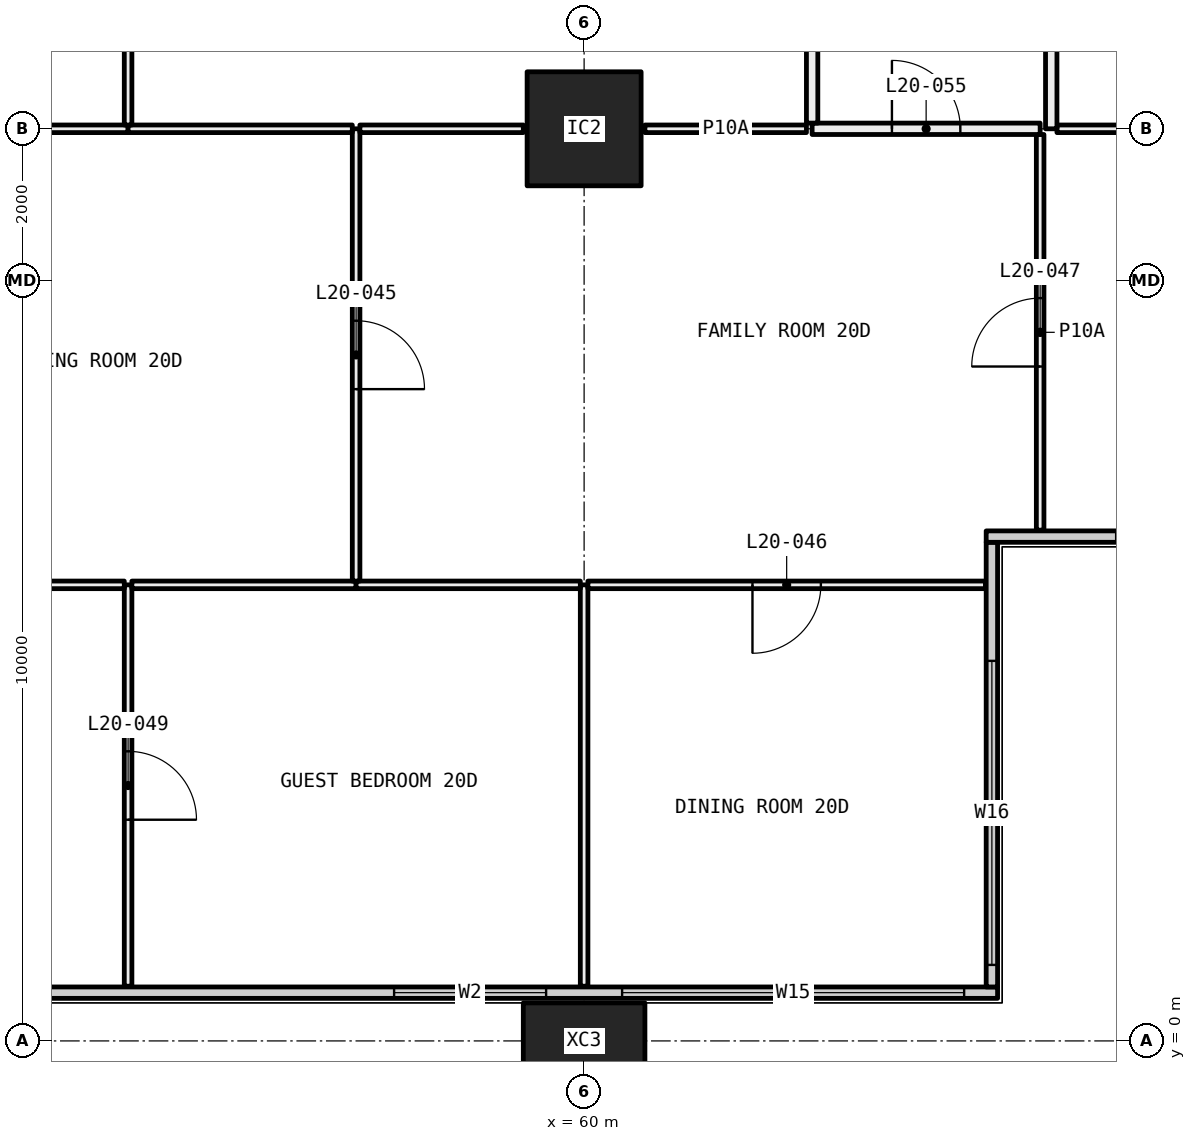
"""IFC4 building model, lengths in metres.
Left out: names, types, materials, properties, quantities, classifications, styles, units other than length and angle.
Written with IfcOpenShell. Run it as: python <this file> out.ifc"""

import sys

from ifc_helpers import new_model, si_unit, direction, frame, frame_2d, origin, origin_2d, place, context, subcontext, project, spatial, rectangle, hollow_rectangle, extrude, element, fill, save


model = new_model("IFC4")
c1 = context("Model", 3, precision=1e-05, world=origin(), true_north=direction((0.0, 1.0)))
c2 = subcontext(c1, "Body", "Model", "MODEL_VIEW")
j1 = project(units=[si_unit("LENGTHUNIT", "METRE"), si_unit("PLANEANGLEUNIT", "RADIAN")], contexts=[c1])
p1 = place(None, origin())
s1 = spatial("IfcSite", under=j1, at=p1, CompositionType="ELEMENT")
p2 = place(p1, origin())
s2 = spatial("IfcBuilding", under=s1, at=p2, CompositionType="ELEMENT")
p3 = place(p2, frame((0.0, 0.0, 81.75)))
s3 = spatial("IfcBuildingStorey", under=s2, at=p3, CompositionType="ELEMENT", Elevation=81.75)
p4 = place(p3, frame((60.0, 0.0, -0.4), z_axis=(0.0, 0.0, 1.0), x_axis=(1.0, 0.0, 0.0)))
e1 = element("IfcColumn", 1, at=p4, inside=s3, PredefinedType="COLUMN", context=c2, shape_type="SweptSolid", body=[
    extrude(hollow_rectangle(XDim=1.6, YDim=1.0, WallThickness=0.065, at=origin_2d()), origin(), (0.0, 0.0, 1.0), 3.45),
])
p5 = place(p3, frame((60.0, 12.0, 0.0), z_axis=(0.0, 0.0, 1.0), x_axis=(1.0, 0.0, 0.0)))
e2 = element("IfcColumn", 2, at=p5, inside=s3, PredefinedType="COLUMN", context=c2, shape_type="SweptSolid", body=[
    extrude(hollow_rectangle(XDim=1.5, YDim=1.5, WallThickness=0.065, at=origin_2d()), origin(), (0.0, 0.0, 1.0), 3.05),
])
p6 = place(p3, frame((6.56, 0.635, 0.0), z_axis=(0.0, 0.0, 1.0), x_axis=(1.0, 0.0, 0.0)))
e3 = element("IfcWall", 3, at=p6, inside=s3, PredefinedType="ELEMENTEDWALL", context=c2, shape_type="SweptSolid", body=[
    extrude(rectangle(XDim=58.88, YDim=0.15, at=frame_2d((29.44, 0.0))), origin(), (0.0, 0.0, 1.0), 3.05),
])
p7 = place(p6, frame((0.44, 0.0, 0.45)))
e4 = element("IfcOpeningElement", 4, at=p7, cuts=e3, PredefinedType="OPENING", context=c2, shape_type="SweptSolid", body=[
    extrude(rectangle(XDim=4.5, YDim=2.55, at=frame_2d((2.25, 1.275))), frame((0.0, 0.085, 0.0), z_axis=(0.0, -1.0, 0.0), x_axis=(1.0, 0.0, 0.0)), (0.0, 0.0, 1.0), 0.17),
])
p8 = place(p6, frame((5.94, 0.0, 0.45)))
e5 = element("IfcOpeningElement", 5, at=p8, cuts=e3, PredefinedType="OPENING", context=c2, shape_type="SweptSolid", body=[
    extrude(rectangle(XDim=3.0, YDim=2.55, at=frame_2d((1.5, 1.275))), frame((0.0, 0.085, 0.0), z_axis=(0.0, -1.0, 0.0), x_axis=(1.0, 0.0, 0.0)), (0.0, 0.0, 1.0), 0.17),
])
p9 = place(p6, frame((13.94, 0.0, 0.45)))
e6 = element("IfcOpeningElement", 6, at=p9, cuts=e3, PredefinedType="OPENING", context=c2, shape_type="SweptSolid", body=[
    extrude(rectangle(XDim=3.0, YDim=2.55, at=frame_2d((1.5, 1.275))), frame((0.0, 0.085, 0.0), z_axis=(0.0, -1.0, 0.0), x_axis=(1.0, 0.0, 0.0)), (0.0, 0.0, 1.0), 0.17),
])
p10 = place(p6, frame((17.94, 0.0, 0.45)))
e7 = element("IfcOpeningElement", 7, at=p10, cuts=e3, PredefinedType="OPENING", context=c2, shape_type="SweptSolid", body=[
    extrude(rectangle(XDim=3.0, YDim=2.55, at=frame_2d((1.5, 1.275))), frame((0.0, 0.085, 0.0), z_axis=(0.0, -1.0, 0.0), x_axis=(1.0, 0.0, 0.0)), (0.0, 0.0, 1.0), 0.17),
])
p11 = place(p6, frame((26.94, 0.0, 0.45)))
e8 = element("IfcOpeningElement", 8, at=p11, cuts=e3, PredefinedType="OPENING", context=c2, shape_type="SweptSolid", body=[
    extrude(rectangle(XDim=2.0, YDim=2.55, at=frame_2d((1.0, 1.275))), frame((0.0, 0.085, 0.0), z_axis=(0.0, -1.0, 0.0), x_axis=(1.0, 0.0, 0.0)), (0.0, 0.0, 1.0), 0.17),
])
p12 = place(p6, frame((29.94, 0.0, 0.45)))
e9 = element("IfcOpeningElement", 9, at=p12, cuts=e3, PredefinedType="OPENING", context=c2, shape_type="SweptSolid", body=[
    extrude(rectangle(XDim=3.0, YDim=2.55, at=frame_2d((1.5, 1.275))), frame((0.0, 0.085, 0.0), z_axis=(0.0, -1.0, 0.0), x_axis=(1.0, 0.0, 0.0)), (0.0, 0.0, 1.0), 0.17),
])
p13 = place(p6, frame((37.94, 0.0, 0.45)))
e10 = element("IfcOpeningElement", 10, at=p13, cuts=e3, PredefinedType="OPENING", context=c2, shape_type="SweptSolid", body=[
    extrude(rectangle(XDim=3.0, YDim=2.55, at=frame_2d((1.5, 1.275))), frame((0.0, 0.085, 0.0), z_axis=(0.0, -1.0, 0.0), x_axis=(1.0, 0.0, 0.0)), (0.0, 0.0, 1.0), 0.17),
])
p14 = place(p6, frame((41.94, 0.0, 0.45)))
e11 = element("IfcOpeningElement", 11, at=p14, cuts=e3, PredefinedType="OPENING", context=c2, shape_type="SweptSolid", body=[
    extrude(rectangle(XDim=3.0, YDim=2.55, at=frame_2d((1.5, 1.275))), frame((0.0, 0.085, 0.0), z_axis=(0.0, -1.0, 0.0), x_axis=(1.0, 0.0, 0.0)), (0.0, 0.0, 1.0), 0.17),
])
p15 = place(p6, frame((50.94, 0.0, 0.45)))
e12 = element("IfcOpeningElement", 12, at=p15, cuts=e3, PredefinedType="OPENING", context=c2, shape_type="SweptSolid", body=[
    extrude(rectangle(XDim=2.0, YDim=2.55, at=frame_2d((1.0, 1.275))), frame((0.0, 0.085, 0.0), z_axis=(0.0, -1.0, 0.0), x_axis=(1.0, 0.0, 0.0)), (0.0, 0.0, 1.0), 0.17),
])
p16 = place(p6, frame((53.94, 0.0, 0.45)))
e13 = element("IfcOpeningElement", 13, at=p16, cuts=e3, PredefinedType="OPENING", context=c2, shape_type="SweptSolid", body=[
    extrude(rectangle(XDim=4.5, YDim=2.55, at=frame_2d((2.25, 1.275))), frame((0.0, 0.085, 0.0), z_axis=(0.0, -1.0, 0.0), x_axis=(1.0, 0.0, 0.0)), (0.0, 0.0, 1.0), 0.17),
])
p17 = place(p3, frame((65.365, 0.71, 0.0), z_axis=(0.0, 0.0, 1.0), x_axis=(0.0, 1.0, 0.0)))
e14 = element("IfcWall", 14, at=p17, inside=s3, PredefinedType="ELEMENTEDWALL", context=c2, shape_type="SweptSolid", body=[
    extrude(rectangle(XDim=5.85, YDim=0.15, at=frame_2d((2.925, 0.0))), origin(), (0.0, 0.0, 1.0), 3.05),
])
p18 = place(p17, frame((0.29, 0.0, 0.45)))
e15 = element("IfcOpeningElement", 15, at=p18, cuts=e14, PredefinedType="OPENING", context=c2, shape_type="SweptSolid", body=[
    extrude(rectangle(XDim=4.0, YDim=2.55, at=frame_2d((2.0, 1.275))), frame((0.0, 0.085, 0.0), z_axis=(0.0, -1.0, 0.0), x_axis=(1.0, 0.0, 0.0)), (0.0, 0.0, 1.0), 0.17),
])
p19 = place(p3, frame((65.29, 6.635, 0.0), z_axis=(0.0, 0.0, 1.0), x_axis=(1.0, 0.0, 0.0)))
e16 = element("IfcWall", 16, at=p19, inside=s3, PredefinedType="ELEMENTEDWALL", context=c2, shape_type="SweptSolid", body=[
    extrude(rectangle(XDim=6.15, YDim=0.15, at=frame_2d((3.075, 0.0))), origin(), (0.0, 0.0, 1.0), 3.05),
])
p20 = place(p19, frame((1.71, 0.0, 0.45)))
e17 = element("IfcOpeningElement", 17, at=p20, cuts=e16, PredefinedType="OPENING", context=c2, shape_type="SweptSolid", body=[
    extrude(rectangle(XDim=4.0, YDim=2.55, at=frame_2d((2.0, 1.275))), frame((0.0, 0.085, 0.0), z_axis=(0.0, -1.0, 0.0), x_axis=(1.0, 0.0, 0.0)), (0.0, 0.0, 1.0), 0.17),
])
p21 = place(p3, frame((54.0, 0.72, 0.0), z_axis=(0.0, 0.0, 1.0), x_axis=(0.0, 1.0, 0.0)))
e18 = element("IfcWall", 18, at=p21, inside=s3, PredefinedType="PARTITIONING", context=c2, shape_type="SweptSolid", body=[
    extrude(rectangle(XDim=5.28, YDim=0.1, at=frame_2d((2.64, 0.0))), origin(), (0.0, 0.0, 1.0), 3.05),
])
p22 = place(p21, frame((2.19, 0.0, 0.0)))
e19 = element("IfcOpeningElement", 19, at=p22, cuts=e18, PredefinedType="OPENING", context=c2, shape_type="SweptSolid", body=[
    extrude(rectangle(XDim=0.9, YDim=2.1, at=frame_2d((0.45, 1.05))), frame((0.0, 0.06, 0.0), z_axis=(0.0, -1.0, 0.0), x_axis=(1.0, 0.0, 0.0)), (0.0, 0.0, 1.0), 0.12),
])
p23 = place(p3, frame((53.95, 6.0, 0.0), z_axis=(0.0, 0.0, 1.0), x_axis=(-1.0, 0.0, 0.0)))
e20 = element("IfcWall", 20, at=p23, inside=s3, PredefinedType="PARTITIONING", context=c2, shape_type="SweptSolid", body=[
    extrude(rectangle(XDim=5.95, YDim=0.1, at=frame_2d((2.975, 0.0))), origin(), (0.0, 0.0, 1.0), 2.45),
])
p24 = place(p23, frame((2.525, 0.0, 0.0)))
e21 = element("IfcOpeningElement", 21, at=p24, cuts=e20, PredefinedType="OPENING", context=c2, shape_type="SweptSolid", body=[
    extrude(rectangle(XDim=0.9, YDim=2.1, at=frame_2d((0.45, 1.05))), frame((0.0, 0.06, 0.0), z_axis=(0.0, -1.0, 0.0), x_axis=(1.0, 0.0, 0.0)), (0.0, 0.0, 1.0), 0.12),
])
p25 = place(p3, frame((60.0, 0.72, 0.0), z_axis=(0.0, 0.0, 1.0), x_axis=(0.0, 1.0, 0.0)))
e22 = element("IfcWall", 22, at=p25, inside=s3, PredefinedType="PARTITIONING", context=c2, shape_type="SweptSolid", body=[
    extrude(rectangle(XDim=5.28, YDim=0.1, at=frame_2d((2.64, 0.0))), origin(), (0.0, 0.0, 1.0), 2.45),
])
p26 = place(p3, frame((57.0, 6.0, 0.0), z_axis=(0.0, 0.0, 1.0), x_axis=(-1.0, 0.0, 0.0)))
e23 = element("IfcWall", 23, at=p26, inside=s3, PredefinedType="PARTITIONING", context=c2, shape_type="SweptSolid", body=[
    extrude(rectangle(XDim=2.95, YDim=0.1, at=frame_2d((1.475, 0.0))), origin(), (0.0, 0.0, 1.0), 3.05),
])
p27 = place(p3, frame((59.95, 6.0, 0.0), z_axis=(0.0, 0.0, 1.0), x_axis=(-1.0, 0.0, 0.0)))
e24 = element("IfcWall", 24, at=p27, inside=s3, PredefinedType="PARTITIONING", context=c2, shape_type="SweptSolid", body=[
    extrude(rectangle(XDim=2.95, YDim=0.1, at=frame_2d((1.475, 0.0))), origin(), (0.0, 0.0, 1.0), 2.45),
])
p28 = place(p3, frame((65.28, 6.0, 0.0), z_axis=(0.0, 0.0, 1.0), x_axis=(-1.0, 0.0, 0.0)))
e25 = element("IfcWall", 25, at=p28, inside=s3, PredefinedType="PARTITIONING", context=c2, shape_type="SweptSolid", body=[
    extrude(rectangle(XDim=5.23, YDim=0.1, at=frame_2d((2.615, 0.0))), origin(), (0.0, 0.0, 1.0), 2.45),
])
p29 = place(p28, frame((2.165, 0.0, 0.0)))
e26 = element("IfcOpeningElement", 26, at=p29, cuts=e25, PredefinedType="OPENING", context=c2, shape_type="SweptSolid", body=[
    extrude(rectangle(XDim=0.9, YDim=2.1, at=frame_2d((0.45, 1.05))), frame((0.0, 0.06, 0.0), z_axis=(0.0, -1.0, 0.0), x_axis=(1.0, 0.0, 0.0)), (0.0, 0.0, 1.0), 0.12),
])
p30 = place(p3, frame((57.0, 6.05, 0.0), z_axis=(0.0, 0.0, 1.0), x_axis=(0.0, 1.0, 0.0)))
e27 = element("IfcWall", 27, at=p30, inside=s3, PredefinedType="PARTITIONING", context=c2, shape_type="SweptSolid", body=[
    extrude(rectangle(XDim=5.95, YDim=0.1, at=frame_2d((2.975, 0.0))), origin(), (0.0, 0.0, 1.0), 2.45),
])
p31 = place(p30, frame((2.525, 0.0, 0.0)))
e28 = element("IfcOpeningElement", 28, at=p31, cuts=e27, PredefinedType="OPENING", context=c2, shape_type="SweptSolid", body=[
    extrude(rectangle(XDim=0.9, YDim=2.1, at=frame_2d((0.45, 1.05))), frame((0.0, 0.06, 0.0), z_axis=(0.0, -1.0, 0.0), x_axis=(1.0, 0.0, 0.0)), (0.0, 0.0, 1.0), 0.12),
])
p32 = place(p3, frame((54.0, 12.0, 0.0), z_axis=(0.0, 0.0, 1.0), x_axis=(-1.0, 0.0, 0.0)))
e29 = element("IfcWall", 29, at=p32, inside=s3, PredefinedType="PARTITIONING", context=c2, shape_type="SweptSolid", body=[
    extrude(rectangle(XDim=4.5, YDim=0.1, at=frame_2d((2.25, 0.0))), origin(), (0.0, 0.0, 1.0), 2.45),
])
p33 = place(p32, frame((1.8, 0.0, 0.0)))
e30 = element("IfcOpeningElement", 30, at=p33, cuts=e29, PredefinedType="OPENING", context=c2, shape_type="SweptSolid", body=[
    extrude(rectangle(XDim=0.9, YDim=2.1, at=frame_2d((0.45, 1.05))), frame((0.0, 0.06, 0.0), z_axis=(0.0, -1.0, 0.0), x_axis=(1.0, 0.0, 0.0)), (0.0, 0.0, 1.0), 0.12),
])
p34 = place(p3, frame((56.95, 12.0, 0.0), z_axis=(0.0, 0.0, 1.0), x_axis=(-1.0, 0.0, 0.0)))
e31 = element("IfcWall", 31, at=p34, inside=s3, PredefinedType="PARTITIONING", context=c2, shape_type="SweptSolid", body=[
    extrude(rectangle(XDim=2.95, YDim=0.1, at=frame_2d((1.475, 0.0))), origin(), (0.0, 0.0, 1.0), 2.45),
])
p35 = place(p3, frame((66.0, 6.72, 0.0), z_axis=(0.0, 0.0, 1.0), x_axis=(0.0, 1.0, 0.0)))
e32 = element("IfcWall", 32, at=p35, inside=s3, PredefinedType="PARTITIONING", context=c2, shape_type="SweptSolid", body=[
    extrude(rectangle(XDim=5.205, YDim=0.1, at=frame_2d((2.603, 0.0))), origin(), (0.0, 0.0, 1.0), 2.45),
])
p36 = place(p35, frame((2.153, 0.0, 0.0)))
e33 = element("IfcOpeningElement", 33, at=p36, cuts=e32, PredefinedType="OPENING", context=c2, shape_type="SweptSolid", body=[
    extrude(rectangle(XDim=0.9, YDim=2.1, at=frame_2d((0.45, 1.05))), frame((0.0, 0.06, 0.0), z_axis=(0.0, -1.0, 0.0), x_axis=(1.0, 0.0, 0.0)), (0.0, 0.0, 1.0), 0.12),
])
p37 = place(p3, frame((59.2, 12.0, 0.0), z_axis=(0.0, 0.0, 1.0), x_axis=(-1.0, 0.0, 0.0)))
e34 = element("IfcWall", 34, at=p37, inside=s3, PredefinedType="PARTITIONING", context=c2, shape_type="SweptSolid", body=[
    extrude(rectangle(XDim=2.15, YDim=0.1, at=frame_2d((1.075, 0.0))), origin(), (0.0, 0.0, 1.0), 2.45),
])
p38 = place(p3, frame((62.925, 12.0, 0.0), z_axis=(0.0, 0.0, 1.0), x_axis=(-1.0, 0.0, 0.0)))
e35 = element("IfcWall", 35, at=p38, inside=s3, PredefinedType="PARTITIONING", context=c2, shape_type="SweptSolid", body=[
    extrude(rectangle(XDim=2.125, YDim=0.1, at=frame_2d((1.062, 0.0))), origin(), (0.0, 0.0, 1.0), 2.45),
])
p39 = place(p3, frame((66.0, 12.0, 0.0), z_axis=(0.0, 0.0, 1.0), x_axis=(-1.0, 0.0, 0.0)))
e36 = element("IfcWall", 36, at=p39, inside=s3, PredefinedType="PARTITIONING", context=c2, shape_type="SweptSolid", body=[
    extrude(rectangle(XDim=3.0, YDim=0.15, at=frame_2d((1.5, 0.0))), origin(), (0.0, 0.0, 1.0), 2.45),
])
p40 = place(p39, frame((1.05, 0.0, 0.0)))
e37 = element("IfcOpeningElement", 37, at=p40, cuts=e36, PredefinedType="OPENING", context=c2, shape_type="SweptSolid", body=[
    extrude(rectangle(XDim=0.9, YDim=2.1, at=frame_2d((0.45, 1.05))), frame((0.0, 0.085, 0.0), z_axis=(0.0, -1.0, 0.0), x_axis=(1.0, 0.0, 0.0)), (0.0, 0.0, 1.0), 0.17),
])
p41 = place(p3, frame((71.28, 12.0, 0.0), z_axis=(0.0, 0.0, 1.0), x_axis=(-1.0, 0.0, 0.0)))
e38 = element("IfcWall", 38, at=p41, inside=s3, PredefinedType="PARTITIONING", context=c2, shape_type="SweptSolid", body=[
    extrude(rectangle(XDim=5.059, YDim=0.1, at=frame_2d((2.53, 0.0))), origin(), (0.0, 0.0, 1.0), 2.45),
])
p42 = place(p41, frame((2.08, 0.0, 0.0)))
e39 = element("IfcOpeningElement", 39, at=p42, cuts=e38, PredefinedType="OPENING", context=c2, shape_type="SweptSolid", body=[
    extrude(rectangle(XDim=0.9, YDim=2.1, at=frame_2d((0.45, 1.05))), frame((0.0, 0.06, 0.0), z_axis=(0.0, -1.0, 0.0), x_axis=(1.0, 0.0, 0.0)), (0.0, 0.0, 1.0), 0.12),
])
p43 = place(p3, frame((54.0, 12.05, 0.0), z_axis=(0.0, 0.0, 1.0), x_axis=(0.0, 1.0, 0.0)))
e40 = element("IfcWall", 40, at=p43, inside=s3, PredefinedType="PARTITIONING", context=c2, shape_type="SweptSolid", body=[
    extrude(rectangle(XDim=5.85, YDim=0.1, at=frame_2d((2.925, 0.0))), origin(), (0.0, 0.0, 1.0), 2.45),
])
p44 = place(p43, frame((2.475, 0.0, 0.0)))
e41 = element("IfcOpeningElement", 41, at=p44, cuts=e40, PredefinedType="OPENING", context=c2, shape_type="SweptSolid", body=[
    extrude(rectangle(XDim=0.9, YDim=2.1, at=frame_2d((0.45, 1.05))), frame((0.0, 0.06, 0.0), z_axis=(0.0, -1.0, 0.0), x_axis=(1.0, 0.0, 0.0)), (0.0, 0.0, 1.0), 0.12),
])
p45 = place(p3, frame((63.0, 12.075, 0.0), z_axis=(0.0, 0.0, 1.0), x_axis=(0.0, 1.0, 0.0)))
e42 = element("IfcWall", 42, at=p45, inside=s3, PredefinedType="PARTITIONING", context=c2, shape_type="SweptSolid", body=[
    extrude(rectangle(XDim=3.739, YDim=0.15, at=frame_2d((1.87, 0.0))), origin(), (0.0, 0.0, 1.0), 2.45),
])
p46 = place(p3, frame((66.146, 15.814, 0.0), z_axis=(0.0, 0.0, 1.0), x_axis=(0.0, -1.0, 0.0)))
e43 = element("IfcWall", 43, at=p46, inside=s3, PredefinedType="PARTITIONING", context=c2, shape_type="SweptSolid", body=[
    extrude(rectangle(XDim=3.814, YDim=0.15, at=frame_2d((1.907, 0.0))), origin(), (0.0, 0.0, 1.0), 2.45),
])
p47 = place(p15, origin())
e44 = element("IfcWindow", 44, at=p47, inside=s3, PartitioningType="SINGLE_PANEL", PredefinedType="WINDOW", context=c2, shape_type="SweptSolid", body=[
    extrude(rectangle(XDim=2.0, YDim=2.55, at=frame_2d((1.0, 1.275))), frame((0.0, 0.03, 0.0), z_axis=(0.0, -1.0, 0.0), x_axis=(1.0, 0.0, 0.0)), (0.0, 0.0, 1.0), 0.06),
])
fill(e12, e44)
p48 = place(p16, origin())
e45 = element("IfcWindow", 45, at=p48, inside=s3, PartitioningType="SINGLE_PANEL", PredefinedType="WINDOW", context=c2, shape_type="SweptSolid", body=[
    extrude(rectangle(XDim=4.5, YDim=2.55, at=frame_2d((2.25, 1.275))), frame((0.0, 0.03, 0.0), z_axis=(0.0, -1.0, 0.0), x_axis=(1.0, 0.0, 0.0)), (0.0, 0.0, 1.0), 0.06),
])
fill(e13, e45)
p49 = place(p18, origin())
e46 = element("IfcWindow", 46, at=p49, inside=s3, PartitioningType="SINGLE_PANEL", PredefinedType="WINDOW", context=c2, shape_type="SweptSolid", body=[
    extrude(rectangle(XDim=4.0, YDim=2.55, at=frame_2d((2.0, 1.275))), frame((0.0, 0.03, 0.0), z_axis=(0.0, -1.0, 0.0), x_axis=(1.0, 0.0, 0.0)), (0.0, 0.0, 1.0), 0.06),
])
fill(e15, e46)
p50 = place(p31, frame((0.9, 0.0, 0.0), x_axis=(-1.0, 0.0, 0.0)))
e47 = element("IfcDoor", 47, at=p50, inside=s3, OperationType="SINGLE_SWING_LEFT", PredefinedType="DOOR", context=c2, shape_type="SweptSolid", body=[
    extrude(rectangle(XDim=0.9, YDim=2.1, at=frame_2d((0.45, 1.05))), frame((0.0, 0.025, 0.0), z_axis=(0.0, -1.0, 0.0), x_axis=(1.0, 0.0, 0.0)), (0.0, 0.0, 1.0), 0.05),
])
fill(e28, e47)
p51 = place(p29, origin())
e48 = element("IfcDoor", 48, at=p51, inside=s3, OperationType="SINGLE_SWING_LEFT", PredefinedType="DOOR", context=c2, shape_type="SweptSolid", body=[
    extrude(rectangle(XDim=0.9, YDim=2.1, at=frame_2d((0.45, 1.05))), frame((0.0, 0.025, 0.0), z_axis=(0.0, -1.0, 0.0), x_axis=(1.0, 0.0, 0.0)), (0.0, 0.0, 1.0), 0.05),
])
fill(e26, e48)
p52 = place(p36, origin())
e49 = element("IfcDoor", 49, at=p52, inside=s3, OperationType="SINGLE_SWING_RIGHT", PredefinedType="DOOR", context=c2, shape_type="SweptSolid", body=[
    extrude(rectangle(XDim=0.9, YDim=2.1, at=frame_2d((0.45, 1.05))), frame((0.0, 0.025, 0.0), z_axis=(0.0, -1.0, 0.0), x_axis=(1.0, 0.0, 0.0)), (0.0, 0.0, 1.0), 0.05),
])
fill(e33, e49)
p53 = place(p22, frame((0.9, 0.0, 0.0), x_axis=(-1.0, 0.0, 0.0)))
e50 = element("IfcDoor", 50, at=p53, inside=s3, OperationType="SINGLE_SWING_LEFT", PredefinedType="DOOR", context=c2, shape_type="SweptSolid", body=[
    extrude(rectangle(XDim=0.9, YDim=2.1, at=frame_2d((0.45, 1.05))), frame((0.0, 0.025, 0.0), z_axis=(0.0, -1.0, 0.0), x_axis=(1.0, 0.0, 0.0)), (0.0, 0.0, 1.0), 0.05),
])
fill(e19, e50)
p54 = place(p40, frame((0.9, 0.0, 0.0), x_axis=(-1.0, 0.0, 0.0)))
e51 = element("IfcDoor", 51, at=p54, inside=s3, OperationType="SINGLE_SWING_RIGHT", PredefinedType="DOOR", context=c2, shape_type="SweptSolid", body=[
    extrude(rectangle(XDim=0.9, YDim=2.1, at=frame_2d((0.45, 1.05))), frame((0.0, 0.025, 0.0), z_axis=(0.0, -1.0, 0.0), x_axis=(1.0, 0.0, 0.0)), (0.0, 0.0, 1.0), 0.05),
])
fill(e37, e51)
save(model, sys.argv[1])
